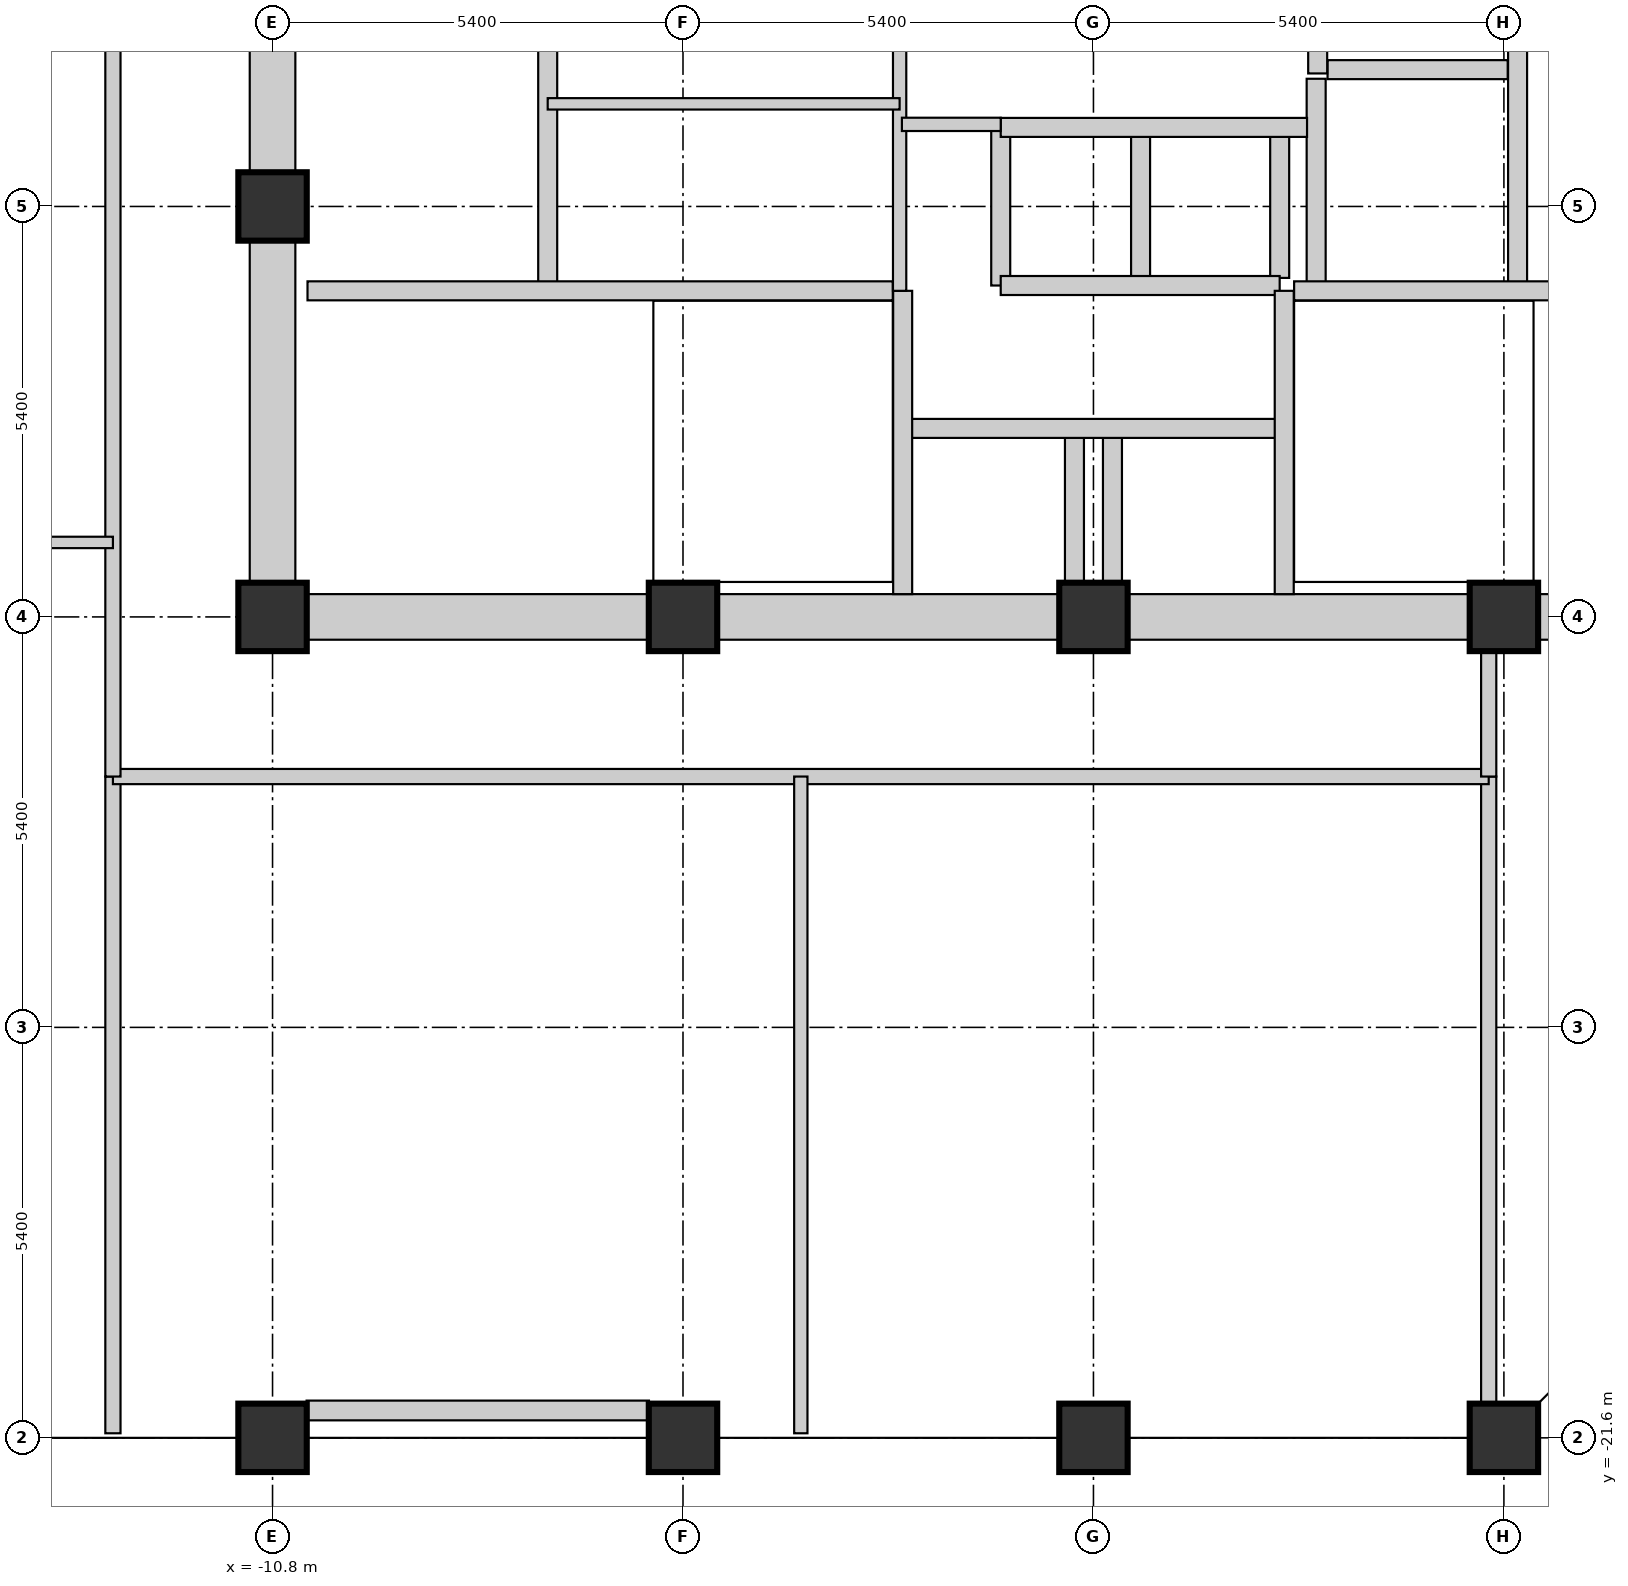
"""IFC4 building model, lengths in metres.
Left out: names, types, materials, properties, quantities, classifications, styles, units other than length and angle.
Written with IfcOpenShell. Run it as: python <this file> out.ifc"""

import sys

from ifc_helpers import new_model, si_unit, direction, frame, frame_2d, origin, origin_2d, place, context, subcontext, project, spatial, rectangle, extrude, element, fill, save


model = new_model("IFC4")
c1 = context("Model", 3, precision=1e-05, world=origin(), true_north=direction((0.0, 1.0)))
c2 = subcontext(c1, "Body", "Model", "MODEL_VIEW")
j1 = project(units=[si_unit("LENGTHUNIT", "METRE"), si_unit("PLANEANGLEUNIT", "RADIAN")], contexts=[c1])
p1 = place(None, origin())
s1 = spatial("IfcSite", under=j1, at=p1, CompositionType="ELEMENT")
p2 = place(p1, origin())
s2 = spatial("IfcBuilding", under=s1, at=p2, CompositionType="ELEMENT")
p3 = place(p2, frame((0.0, 0.0, 174.75)))
s3 = spatial("IfcBuildingStorey", under=s2, at=p3, CompositionType="ELEMENT", Elevation=174.75)
for number, where, z_axis, x_axis in (
    (1, (-10.8, -21.6, 0.0), (0.0, 0.0, 1.0), (1.0, 0.0, 0.0)),
    (2, (-10.8, -10.8, 0.0), (0.0, 0.0, 1.0), (1.0, 0.0, 0.0)),
    (3, (-10.8, -5.4, 0.0), (0.0, 0.0, 1.0), (1.0, 0.0, 0.0)),
    (4, (-5.4, -21.6, 0.0), (0.0, 0.0, 1.0), (1.0, 0.0, 0.0)),
    (5, (-5.4, -10.8, 0.0), (0.0, 0.0, 1.0), (1.0, 0.0, 0.0)),
    (6, (0.0, -21.6, 0.0), (0.0, 0.0, 1.0), (1.0, 0.0, 0.0)),
    (7, (0.0, -10.8, 0.0), (0.0, 0.0, 1.0), (1.0, 0.0, 0.0)),
    (8, (5.4, -21.6, 0.0), (0.0, 0.0, 1.0), (1.0, 0.0, 0.0)),
    (9, (5.4, -10.8, 0.0), (0.0, 0.0, 1.0), (1.0, 0.0, 0.0)),
):
    element("IfcColumn", number, at=place(p3, frame(where, z_axis=z_axis, x_axis=x_axis)), inside=s3, PredefinedType="COLUMN", context=c2, shape_type="SweptSolid", body=[
        extrude(rectangle(XDim=0.9, YDim=0.9, at=origin_2d()), origin(), (0.0, 0.0, 1.0), 3.75),
    ])
for number, where, z_axis, x_axis in (
    (10, (-10.34, -10.8, 0.0), (0.0, 0.0, 1.0), (1.0, 0.0, 0.0)),
    (11, (-10.8, -10.34, 0.0), (0.0, 0.0, 1.0), (0.0, 1.0, 0.0)),
    (12, (-4.94, -10.8, 0.0), (0.0, 0.0, 1.0), (1.0, 0.0, 0.0)),
):
    element("IfcWall", number, at=place(p3, frame(where, z_axis=z_axis, x_axis=x_axis)), inside=s3, PredefinedType="SHEAR", context=c2, shape_type="SweptSolid", body=[
        extrude(rectangle(XDim=4.48, YDim=0.6, at=frame_2d((2.24, 0.0))), origin(), (0.0, 0.0, 1.0), 3.75),
    ])
p4 = place(p3, frame((-10.8, -4.94, 0.0), z_axis=(0.0, 0.0, 1.0), x_axis=(0.0, 1.0, 0.0)))
e13 = element("IfcWall", 13, at=p4, inside=s3, PredefinedType="SHEAR", context=c2, shape_type="SweptSolid", body=[
    extrude(rectangle(XDim=4.48, YDim=0.6, at=frame_2d((2.24, 0.0))), origin(), (0.0, 0.0, 1.0), 3.75),
])
p5 = place(p4, frame((1.69, 0.0, 0.0)))
e14 = element("IfcOpeningElement", 14, at=p5, cuts=e13, PredefinedType="OPENING", context=c2, shape_type="SweptSolid", body=[
    extrude(rectangle(XDim=1.1, YDim=2.1, at=frame_2d((0.55, 1.05))), frame((0.0, 0.31, 0.0), z_axis=(0.0, -1.0, 0.0), x_axis=(1.0, 0.0, 0.0)), (0.0, 0.0, 1.0), 0.62),
])
for number, where, z_axis, x_axis in (
    (15, (0.46, -10.8, 0.0), (0.0, 0.0, 1.0), (1.0, 0.0, 0.0)),
    (16, (5.86, -10.8, 0.0), (0.0, 0.0, 1.0), (1.0, 0.0, 0.0)),
):
    element("IfcWall", number, at=place(p3, frame(where, z_axis=z_axis, x_axis=x_axis)), inside=s3, PredefinedType="SHEAR", context=c2, shape_type="SweptSolid", body=[
        extrude(rectangle(XDim=4.48, YDim=0.6, at=frame_2d((2.24, 0.0))), origin(), (0.0, 0.0, 1.0), 3.75),
    ])
p6 = place(p3, frame((-10.352, -21.24, 0.0), z_axis=(0.0, 0.0, 1.0), x_axis=(1.0, 0.0, 0.0)))
e17 = element("IfcWall", 17, at=p6, inside=s3, PredefinedType="STANDARD", context=c2, shape_type="SweptSolid", body=[
    extrude(rectangle(XDim=4.504, YDim=0.26, at=frame_2d((2.252, 0.0))), origin(), (0.0, 0.0, 1.0), 2.78),
])
p7 = place(p3, frame((2.93, -6.51, 0.0), z_axis=(0.0, 0.0, 1.0), x_axis=(0.0, 1.0, 0.0)))
e18 = element("IfcWall", 18, at=p7, inside=s3, PredefinedType="SHEAR", context=c2, shape_type="SweptSolid", body=[
    extrude(rectangle(XDim=2.79, YDim=0.25, at=frame_2d((1.395, 0.0))), origin(), (0.0, 0.0, 1.0), 3.75),
])
p8 = place(p3, frame((3.08, -3.6, 0.0), z_axis=(0.0, 0.0, 1.0), x_axis=(1.0, 0.0, 0.0)))
e19 = element("IfcWall", 19, at=p8, inside=s3, PredefinedType="SHEAR", context=c2, shape_type="SweptSolid", body=[
    extrude(rectangle(XDim=2.37, YDim=0.25, at=frame_2d((1.185, 0.0))), origin(), (0.0, 0.0, 1.0), 3.75),
])
p9 = place(p3, frame((5.58, -6.51, 0.0), z_axis=(0.0, 0.0, 1.0), x_axis=(0.0, 1.0, 0.0)))
e20 = element("IfcWall", 20, at=p9, inside=s3, PredefinedType="SHEAR", context=c2, shape_type="SweptSolid", body=[
    extrude(rectangle(XDim=5.09, YDim=0.25, at=frame_2d((2.545, 0.0))), origin(), (0.0, 0.0, 1.0), 3.75),
])
p10 = place(p9, frame((0.85, 0.0, 0.0)))
e21 = element("IfcOpeningElement", 21, at=p10, cuts=e20, PredefinedType="OPENING", context=c2, shape_type="SweptSolid", body=[
    extrude(rectangle(XDim=1.1, YDim=2.1, at=frame_2d((0.55, 1.05))), frame((0.0, 0.135, 0.0), z_axis=(0.0, -1.0, 0.0), x_axis=(1.0, 0.0, 0.0)), (0.0, 0.0, 1.0), 0.27),
])
for number, where, z_axis, x_axis in (
    (22, (0.62, -6.34, 0.0), (0.0, 0.0, 1.0), (0.0, 1.0, 0.0)),
    (23, (2.45, -6.34, 0.0), (0.0, 0.0, 1.0), (0.0, 1.0, 0.0)),
):
    element("IfcWall", number, at=place(p3, frame(where, z_axis=z_axis, x_axis=x_axis)), inside=s3, PredefinedType="SHEAR", context=c2, shape_type="SweptSolid", body=[
        extrude(rectangle(XDim=1.88, YDim=0.25, at=frame_2d((0.94, 0.0))), origin(), (0.0, 0.0, 1.0), 3.75),
    ])
for number, where, z_axis, x_axis in (
    (24, (-0.25, -10.35, 0.0), (0.0, 0.0, 1.0), (0.0, 1.0, 0.0)),
    (25, (0.25, -10.35, 0.0), (0.0, 0.0, 1.0), (0.0, 1.0, 0.0)),
):
    element("IfcWall", number, at=place(p3, frame(where, z_axis=z_axis, x_axis=x_axis)), inside=s3, PredefinedType="SHEAR", context=c2, shape_type="SweptSolid", body=[
        extrude(rectangle(XDim=1.91, YDim=0.25, at=frame_2d((0.955, 0.0))), origin(), (0.0, 0.0, 1.0), 3.75),
    ])
p11 = place(p3, frame((-1.22, -6.44, 0.0), z_axis=(0.0, 0.0, 1.0), x_axis=(0.0, 1.0, 0.0)))
e26 = element("IfcWall", 26, at=p11, inside=s3, PredefinedType="SHEAR", context=c2, shape_type="SweptSolid", body=[
    extrude(rectangle(XDim=2.08, YDim=0.25, at=frame_2d((1.04, 0.0))), origin(), (0.0, 0.0, 1.0), 3.75),
])
p12 = place(p3, frame((-1.22, -6.44, 0.0), z_axis=(0.0, 0.0, 1.0), x_axis=(1.0, 0.0, 0.0)))
e27 = element("IfcWall", 27, at=p12, inside=s3, PredefinedType="SHEAR", context=c2, shape_type="SweptSolid", body=[
    extrude(rectangle(XDim=3.67, YDim=0.25, at=frame_2d((1.835, 0.0))), origin(), (0.0, 0.0, 1.0), 3.75),
])
p13 = place(p3, frame((-2.48, -8.32, 0.0), z_axis=(0.0, 0.0, 1.0), x_axis=(1.0, 0.0, 0.0)))
e28 = element("IfcWall", 28, at=p13, inside=s3, PredefinedType="SHEAR", context=c2, shape_type="SweptSolid", body=[
    extrude(rectangle(XDim=4.93, YDim=0.25, at=frame_2d((2.465, 0.0))), origin(), (0.0, 0.0, 1.0), 3.75),
])
p14 = place(p3, frame((-1.22, -4.36, 0.0), z_axis=(0.0, 0.0, 1.0), x_axis=(1.0, 0.0, 0.0)))
e29 = element("IfcWall", 29, at=p14, inside=s3, PredefinedType="SHEAR", context=c2, shape_type="SweptSolid", body=[
    extrude(rectangle(XDim=4.03, YDim=0.25, at=frame_2d((2.015, 0.0))), origin(), (0.0, 0.0, 1.0), 3.75),
])
p15 = place(p3, frame((2.95, -3.65, 0.0), z_axis=(0.0, 0.0, 1.0), x_axis=(0.0, 1.0, 0.0)))
e30 = element("IfcWall", 30, at=p15, inside=s3, PredefinedType="SHEAR", context=c2, shape_type="SweptSolid", body=[
    extrude(rectangle(XDim=2.4, YDim=0.25, at=frame_2d((1.2, 0.0))), origin(), (0.0, 0.0, 1.0), 3.75),
])
p16 = place(p15, frame((0.775, 0.0, 0.0)))
e31 = element("IfcOpeningElement", 31, at=p16, cuts=e30, PredefinedType="OPENING", context=c2, shape_type="SweptSolid", body=[
    extrude(rectangle(XDim=0.85, YDim=2.1, at=frame_2d((0.425, 1.05))), frame((0.0, 0.135, 0.0), z_axis=(0.0, -1.0, 0.0), x_axis=(1.0, 0.0, 0.0)), (0.0, 0.0, 1.0), 0.27),
])
p17 = place(p3, frame((2.64, -6.51, 0.0), z_axis=(0.0, 0.0, 1.0), x_axis=(1.0, 0.0, 0.0)))
e32 = element("IfcWall", 32, at=p17, inside=s3, PredefinedType="SHEAR", context=c2, shape_type="SweptSolid", body=[
    extrude(rectangle(XDim=7.7, YDim=0.25, at=frame_2d((3.85, 0.0))), origin(), (0.0, 0.0, 1.0), 3.75),
])
p18 = place(p17, frame((6.0, 0.0, 0.0)))
e33 = element("IfcOpeningElement", 33, at=p18, cuts=e32, PredefinedType="OPENING", context=c2, shape_type="SweptSolid", body=[
    extrude(rectangle(XDim=0.95, YDim=2.1, at=frame_2d((0.475, 1.05))), frame((0.0, 0.135, 0.0), z_axis=(0.0, -1.0, 0.0), x_axis=(1.0, 0.0, 0.0)), (0.0, 0.0, 1.0), 0.27),
])
for number, where, z_axis, x_axis in (
    (34, (2.51, -10.5, 0.0), (0.0, 0.0, 1.0), (0.0, 1.0, 0.0)),
    (35, (-2.51, -10.5, 0.0), (0.0, 0.0, 1.0), (0.0, 1.0, 0.0)),
):
    element("IfcWall", number, at=place(p3, frame(where, z_axis=z_axis, x_axis=x_axis)), inside=s3, PredefinedType="SHEAR", context=c2, shape_type="SweptSolid", body=[
        extrude(rectangle(XDim=3.99, YDim=0.25, at=frame_2d((1.995, 0.0))), origin(), (0.0, 0.0, 1.0), 3.75),
    ])
p19 = place(p3, frame((-7.18, -6.51, 0.0), z_axis=(0.0, 0.0, 1.0), x_axis=(0.0, 1.0, 0.0)))
e36 = element("IfcWall", 36, at=p19, inside=s3, PredefinedType="SHEAR", context=c2, shape_type="SweptSolid", body=[
    extrude(rectangle(XDim=5.09, YDim=0.25, at=frame_2d((2.545, 0.0))), origin(), (0.0, 0.0, 1.0), 3.75),
])
p20 = place(p3, frame((-10.34, -6.51, 0.0), z_axis=(0.0, 0.0, 1.0), x_axis=(1.0, 0.0, 0.0)))
e37 = element("IfcWall", 37, at=p20, inside=s3, PredefinedType="SHEAR", context=c2, shape_type="SweptSolid", body=[
    extrude(rectangle(XDim=7.7, YDim=0.25, at=frame_2d((3.85, 0.0))), origin(), (0.0, 0.0, 1.0), 3.75),
])
p21 = place(p20, frame((0.35, 0.0, 0.0)))
e38 = element("IfcOpeningElement", 38, at=p21, cuts=e37, PredefinedType="OPENING", context=c2, shape_type="SweptSolid", body=[
    extrude(rectangle(XDim=1.1, YDim=2.1, at=frame_2d((0.55, 1.05))), frame((0.0, 0.135, 0.0), z_axis=(0.0, -1.0, 0.0), x_axis=(1.0, 0.0, 0.0)), (0.0, 0.0, 1.0), 0.27),
])
p22 = place(p3, frame((-2.55, -6.51, 0.0), z_axis=(0.0, 0.0, 1.0), x_axis=(0.0, 1.0, 0.0)))
e39 = element("IfcWall", 39, at=p22, inside=s3, PredefinedType="PARTITIONING", context=c2, shape_type="SweptSolid", body=[
    extrude(rectangle(XDim=5.16, YDim=0.175, at=frame_2d((2.58, 0.0))), origin(), (0.0, 0.0, 1.0), 3.57),
])
p23 = place(p22, frame((3.3, 0.0, 0.0)))
e40 = element("IfcOpeningElement", 40, at=p23, cuts=e39, PredefinedType="OPENING", context=c2, shape_type="SweptSolid", body=[
    extrude(rectangle(XDim=0.85, YDim=2.1, at=frame_2d((0.425, 1.05))), frame((0.0, 0.097, 0.0), z_axis=(0.0, -1.0, 0.0), x_axis=(1.0, 0.0, 0.0)), (0.0, 0.0, 1.0), 0.195),
])
p24 = place(p3, frame((-7.18, -4.05, 0.0), z_axis=(0.0, 0.0, 1.0), x_axis=(1.0, 0.0, 0.0)))
e41 = element("IfcWall", 41, at=p24, inside=s3, PredefinedType="PARTITIONING", context=c2, shape_type="SweptSolid", body=[
    extrude(rectangle(XDim=4.63, YDim=0.15, at=frame_2d((2.315, 0.0))), origin(), (0.0, 0.0, 1.0), 3.57),
])
p25 = place(p24, frame((1.0, 0.0, 0.0)))
e42 = element("IfcOpeningElement", 42, at=p25, cuts=e41, PredefinedType="OPENING", context=c2, shape_type="SweptSolid", body=[
    extrude(rectangle(XDim=0.85, YDim=2.1, at=frame_2d((0.425, 1.05))), frame((0.0, 0.085, 0.0), z_axis=(0.0, -1.0, 0.0), x_axis=(1.0, 0.0, 0.0)), (0.0, 0.0, 1.0), 0.17),
])
p26 = place(p3, frame((-2.52, -4.32, 0.0), z_axis=(0.0, 0.0, 1.0), x_axis=(1.0, 0.0, 0.0)))
e43 = element("IfcWall", 43, at=p26, inside=s3, PredefinedType="PARTITIONING", context=c2, shape_type="SweptSolid", body=[
    extrude(rectangle(XDim=1.3, YDim=0.175, at=frame_2d((0.65, 0.0))), origin(), (0.0, 0.0, 1.0), 3.57),
])
p27 = place(p26, frame((0.22, 0.0, 0.0)))
e44 = element("IfcOpeningElement", 44, at=p27, cuts=e43, PredefinedType="OPENING", context=c2, shape_type="SweptSolid", body=[
    extrude(rectangle(XDim=0.85, YDim=2.1, at=frame_2d((0.425, 1.05))), frame((0.0, 0.097, 0.0), z_axis=(0.0, -1.0, 0.0), x_axis=(1.0, 0.0, 0.0)), (0.0, 0.0, 1.0), 0.195),
])
for number, where, z_axis, x_axis in (
    (45, (5.2, -21.54, 0.0), (0.0, 0.0, 1.0), (0.0, 1.0, 0.0)),
    (46, (-12.9, -21.54, 0.0), (0.0, 0.0, 1.0), (0.0, 1.0, 0.0)),
):
    element("IfcWall", number, at=place(p3, frame(where, z_axis=z_axis, x_axis=x_axis)), inside=s3, PredefinedType="PARTITIONING", context=c2, shape_type="SweptSolid", body=[
        extrude(rectangle(XDim=8.64, YDim=0.2, at=frame_2d((4.32, 0.0))), origin(), (0.0, 0.0, 1.0), 2.78),
    ])
p28 = place(p3, frame((-12.9, -12.9, 0.0), z_axis=(0.0, 0.0, 1.0), x_axis=(1.0, 0.0, 0.0)))
e47 = element("IfcWall", 47, at=p28, inside=s3, PredefinedType="PARTITIONING", context=c2, shape_type="SweptSolid", body=[
    extrude(rectangle(XDim=18.1, YDim=0.2, at=frame_2d((9.05, 0.0))), origin(), (0.0, 0.0, 1.0), 3.006),
])
p29 = place(p28, frame((4.075, 0.0, 0.0)))
e48 = element("IfcOpeningElement", 48, at=p29, cuts=e47, PredefinedType="OPENING", context=c2, shape_type="SweptSolid", body=[
    extrude(rectangle(XDim=0.85, YDim=2.1, at=frame_2d((0.425, 1.05))), frame((0.0, 0.11, 0.0), z_axis=(0.0, -1.0, 0.0), x_axis=(1.0, 0.0, 0.0)), (0.0, 0.0, 1.0), 0.22),
])
p30 = place(p28, frame((13.125, 0.0, 0.0)))
e49 = element("IfcOpeningElement", 49, at=p30, cuts=e47, PredefinedType="OPENING", context=c2, shape_type="SweptSolid", body=[
    extrude(rectangle(XDim=0.85, YDim=2.1, at=frame_2d((0.425, 1.05))), frame((0.0, 0.11, 0.0), z_axis=(0.0, -1.0, 0.0), x_axis=(1.0, 0.0, 0.0)), (0.0, 0.0, 1.0), 0.22),
])
p31 = place(p3, frame((5.2, -12.9, 0.0), z_axis=(0.0, 0.0, 1.0), x_axis=(0.0, 1.0, 0.0)))
e50 = element("IfcWall", 50, at=p31, inside=s3, PredefinedType="PARTITIONING", context=c2, shape_type="SweptSolid", body=[
    extrude(rectangle(XDim=1.86, YDim=0.2, at=frame_2d((0.93, 0.0))), origin(), (0.0, 0.0, 1.0), 3.006),
])
p32 = place(p3, frame((-12.9, -12.9, 0.0), z_axis=(0.0, 0.0, 1.0), x_axis=(0.0, 1.0, 0.0)))
e51 = element("IfcWall", 51, at=p32, inside=s3, PredefinedType="PARTITIONING", context=c2, shape_type="SweptSolid", body=[
    extrude(rectangle(XDim=11.0, YDim=0.2, at=frame_2d((5.5, 0.0))), origin(), (0.0, 0.0, 1.0), 3.006),
])
p33 = place(p32, frame((1.09, 0.0, 0.0)))
e52 = element("IfcOpeningElement", 52, at=p33, cuts=e51, PredefinedType="OPENING", context=c2, shape_type="SweptSolid", body=[
    extrude(rectangle(XDim=0.85, YDim=2.1, at=frame_2d((0.425, 1.05))), frame((0.0, 0.11, 0.0), z_axis=(0.0, -1.0, 0.0), x_axis=(1.0, 0.0, 0.0)), (0.0, 0.0, 1.0), 0.22),
])
p34 = place(p32, frame((4.362, 0.0, 0.0)))
e53 = element("IfcOpeningElement", 53, at=p34, cuts=e51, PredefinedType="OPENING", context=c2, shape_type="SweptSolid", body=[
    extrude(rectangle(XDim=0.95, YDim=2.1, at=frame_2d((0.475, 1.05))), frame((0.0, 0.11, 0.0), z_axis=(0.0, -1.0, 0.0), x_axis=(1.0, 0.0, 0.0)), (0.0, 0.0, 1.0), 0.22),
])
p35 = place(p3, frame((-3.85, -21.54, 0.0), z_axis=(0.0, 0.0, 1.0), x_axis=(0.0, 1.0, 0.0)))
e54 = element("IfcWall", 54, at=p35, inside=s3, PredefinedType="PARTITIONING", context=c2, shape_type="SweptSolid", body=[
    extrude(rectangle(XDim=8.64, YDim=0.175, at=frame_2d((4.32, 0.0))), origin(), (0.0, 0.0, 1.0), 2.78),
])
p36 = place(p3, frame((-26.94, -9.82, 0.0), z_axis=(0.0, 0.0, 1.0), x_axis=(1.0, 0.0, 0.0)))
e55 = element("IfcWall", 55, at=p36, inside=s3, PredefinedType="PARTITIONING", context=c2, shape_type="SweptSolid", body=[
    extrude(rectangle(XDim=14.04, YDim=0.15, at=frame_2d((7.02, 0.0))), origin(), (0.0, 0.0, 1.0), 2.78),
])
p37 = place(p21, origin())
e56 = element("IfcDoor", 56, at=p37, inside=s3, OperationType="SINGLE_SWING_RIGHT", PredefinedType="DOOR", context=c2, shape_type="SweptSolid", body=[
    extrude(rectangle(XDim=1.1, YDim=2.1, at=frame_2d((0.55, 1.05))), frame((0.0, 0.025, 0.0), z_axis=(0.0, -1.0, 0.0), x_axis=(1.0, 0.0, 0.0)), (0.0, 0.0, 1.0), 0.05),
])
fill(e38, e56)
p38 = place(p10, origin())
e57 = element("IfcDoor", 57, at=p38, inside=s3, OperationType="SLIDING_TO_RIGHT", PredefinedType="DOOR", context=c2, shape_type="SweptSolid", body=[
    extrude(rectangle(XDim=1.1, YDim=2.1, at=frame_2d((0.55, 1.05))), frame((0.0, 0.025, 0.0), z_axis=(0.0, -1.0, 0.0), x_axis=(1.0, 0.0, 0.0)), (0.0, 0.0, 1.0), 0.05),
])
fill(e21, e57)
p39 = place(p27, origin())
e58 = element("IfcDoor", 58, at=p39, inside=s3, OperationType="SINGLE_SWING_LEFT", PredefinedType="DOOR", context=c2, shape_type="SweptSolid", body=[
    extrude(rectangle(XDim=0.85, YDim=2.1, at=frame_2d((0.425, 1.05))), frame((0.0, 0.025, 0.0), z_axis=(0.0, -1.0, 0.0), x_axis=(1.0, 0.0, 0.0)), (0.0, 0.0, 1.0), 0.05),
])
fill(e44, e58)
p40 = place(p25, origin())
e59 = element("IfcDoor", 59, at=p40, inside=s3, OperationType="SINGLE_SWING_RIGHT", PredefinedType="DOOR", context=c2, shape_type="SweptSolid", body=[
    extrude(rectangle(XDim=0.85, YDim=2.1, at=frame_2d((0.425, 1.05))), frame((0.0, 0.025, 0.0), z_axis=(0.0, -1.0, 0.0), x_axis=(1.0, 0.0, 0.0)), (0.0, 0.0, 1.0), 0.05),
])
fill(e42, e59)
p41 = place(p33, origin())
e60 = element("IfcDoor", 60, at=p41, inside=s3, OperationType="SINGLE_SWING_LEFT", PredefinedType="DOOR", context=c2, shape_type="SweptSolid", body=[
    extrude(rectangle(XDim=0.85, YDim=2.1, at=frame_2d((0.425, 1.05))), frame((0.0, 0.025, 0.0), z_axis=(0.0, -1.0, 0.0), x_axis=(1.0, 0.0, 0.0)), (0.0, 0.0, 1.0), 0.05),
])
fill(e52, e60)
p42 = place(p34, origin())
e61 = element("IfcDoor", 61, at=p42, inside=s3, OperationType="SINGLE_SWING_RIGHT", PredefinedType="DOOR", context=c2, shape_type="SweptSolid", body=[
    extrude(rectangle(XDim=0.95, YDim=2.1, at=frame_2d((0.475, 1.05))), frame((0.0, 0.025, 0.0), z_axis=(0.0, -1.0, 0.0), x_axis=(1.0, 0.0, 0.0)), (0.0, 0.0, 1.0), 0.05),
])
fill(e53, e61)
p43 = place(p29, origin())
e62 = element("IfcDoor", 62, at=p43, inside=s3, OperationType="SINGLE_SWING_LEFT", PredefinedType="DOOR", context=c2, shape_type="SweptSolid", body=[
    extrude(rectangle(XDim=0.85, YDim=2.1, at=frame_2d((0.425, 1.05))), frame((0.0, 0.025, 0.0), z_axis=(0.0, -1.0, 0.0), x_axis=(1.0, 0.0, 0.0)), (0.0, 0.0, 1.0), 0.05),
])
fill(e48, e62)
p44 = place(p30, origin())
e63 = element("IfcDoor", 63, at=p44, inside=s3, OperationType="SINGLE_SWING_RIGHT", PredefinedType="DOOR", context=c2, shape_type="SweptSolid", body=[
    extrude(rectangle(XDim=0.85, YDim=2.1, at=frame_2d((0.425, 1.05))), frame((0.0, 0.025, 0.0), z_axis=(0.0, -1.0, 0.0), x_axis=(1.0, 0.0, 0.0)), (0.0, 0.0, 1.0), 0.05),
])
fill(e49, e63)
save(model, sys.argv[1])
